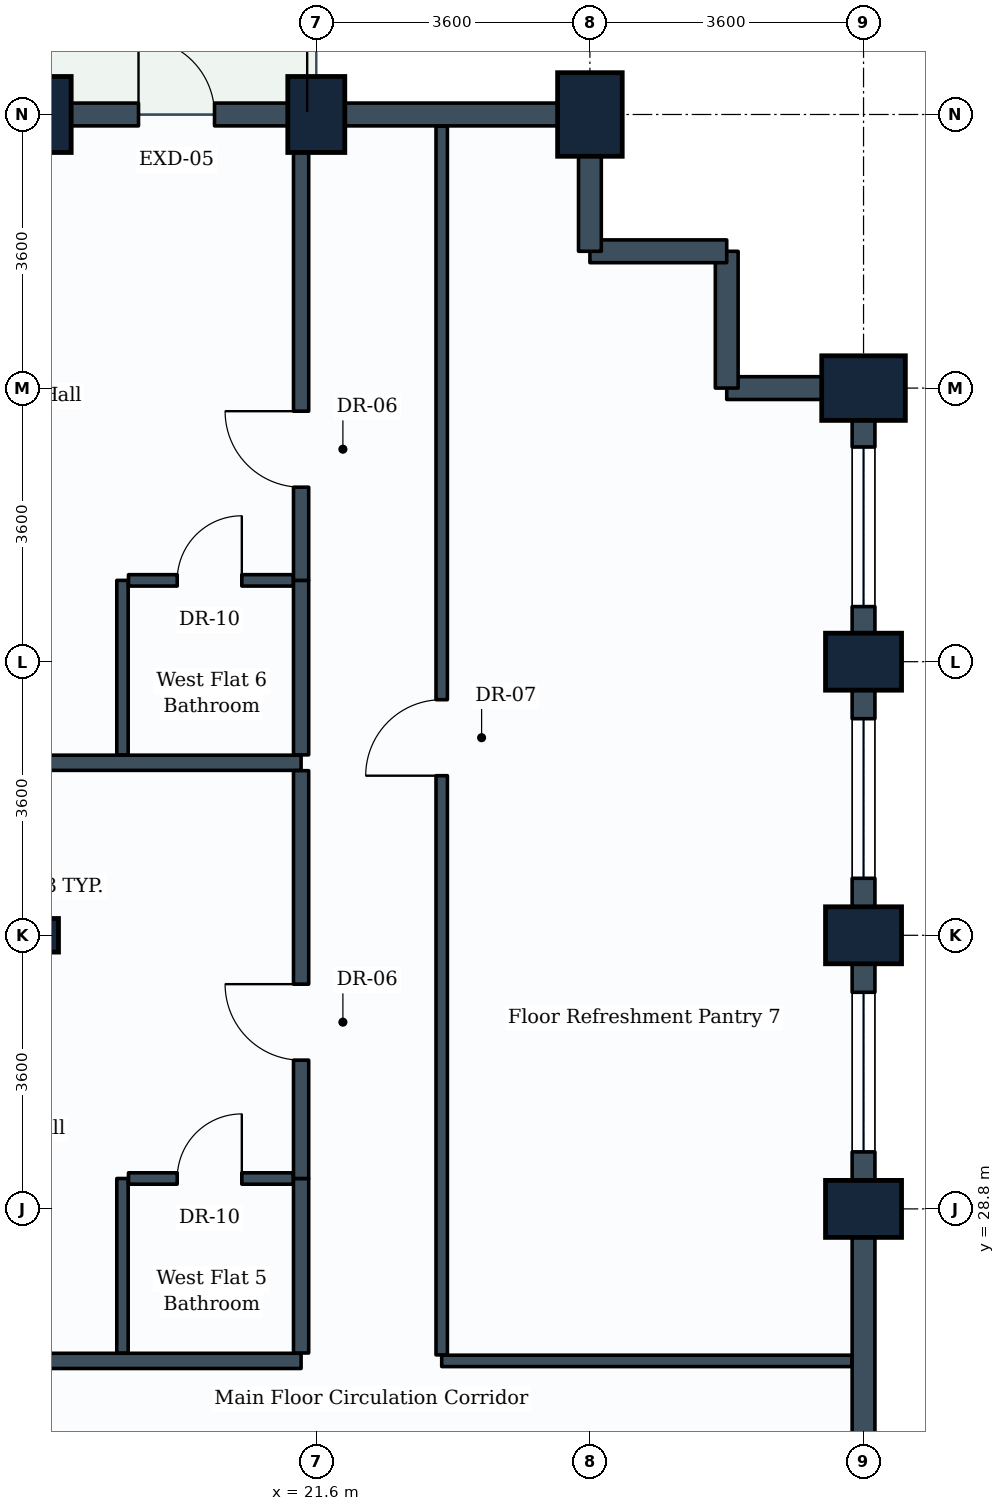
"""IFC4 building model, lengths in metres.
Left out: names, types, materials, properties, quantities, classifications, styles, units other than length and angle.
Written with IfcOpenShell. Run it as: python <this file> out.ifc"""

import sys

from ifc_helpers import new_model, si_unit, direction, frame, frame_2d, origin, origin_2d, place, context, subcontext, project, spatial, rectangle, i_section, extrude, element, fill, save


model = new_model("IFC4")
c1 = context("Model", 3, precision=1e-05, world=origin(), true_north=direction((0.0, 1.0)))
c2 = subcontext(c1, "Body", "Model", "MODEL_VIEW")
j1 = project(units=[si_unit("LENGTHUNIT", "METRE"), si_unit("PLANEANGLEUNIT", "RADIAN")], contexts=[c1])
p1 = place(None, origin())
s1 = spatial("IfcSite", under=j1, at=p1, CompositionType="ELEMENT")
p2 = place(p1, origin())
s2 = spatial("IfcBuilding", under=s1, at=p2, CompositionType="ELEMENT")
p3 = place(p2, frame((0.0, 0.0, 131.4)))
s3 = spatial("IfcBuildingStorey", under=s2, at=p3, CompositionType="ELEMENT", Elevation=131.4)
p4 = place(p3, frame((18.0, 32.4, 0.0), z_axis=(0.0, 0.0, 1.0), x_axis=(1.0, 0.0, 0.0)))
e1 = element("IfcColumn", 1, at=p4, inside=s3, PredefinedType="COLUMN", context=c2, shape_type="SweptSolid", body=[
    extrude(i_section(OverallWidth=0.416, OverallDepth=0.442, WebThickness=0.025, FlangeThickness=0.041, FilletRadius=0.015, at=origin_2d()), origin(), (0.0, 0.0, 1.0), 3.8),
])
for number, where, z_axis, x_axis in (
    (2, (18.0, 43.2, 0.0), (0.0, 0.0, 1.0), (1.0, 0.0, 0.0)),
    (3, (21.6, 43.2, 0.0), (0.0, 0.0, 1.0), (1.0, 0.0, 0.0)),
):
    element("IfcColumn", number, at=place(p3, frame(where, z_axis=z_axis, x_axis=x_axis)), inside=s3, PredefinedType="COLUMN", context=c2, shape_type="SweptSolid", body=[
        extrude(rectangle(XDim=0.75, YDim=1.0, at=origin_2d()), origin(), (0.0, 0.0, 1.0), 3.8),
    ])
p5 = place(p3, frame((25.2, 43.2, 0.0), z_axis=(0.0, 0.0, 1.0), x_axis=(1.0, 0.0, 0.0)))
e4 = element("IfcColumn", 4, at=p5, inside=s3, PredefinedType="COLUMN", context=c2, shape_type="SweptSolid", body=[
    extrude(rectangle(XDim=0.85, YDim=1.1, at=origin_2d()), origin(), (0.0, 0.0, 1.0), 3.8),
])
for number, where, z_axis, x_axis in (
    (5, (28.8, 28.8, 0.0), (0.0, 0.0, 1.0), (0.0, 1.0, 0.0)),
    (6, (28.8, 32.4, 0.0), (0.0, 0.0, 1.0), (0.0, 1.0, 0.0)),
    (7, (28.8, 36.0, 0.0), (0.0, 0.0, 1.0), (0.0, 1.0, 0.0)),
):
    element("IfcColumn", number, at=place(p3, frame(where, z_axis=z_axis, x_axis=x_axis)), inside=s3, PredefinedType="COLUMN", context=c2, shape_type="SweptSolid", body=[
        extrude(rectangle(XDim=0.75, YDim=1.0, at=origin_2d()), origin(), (0.0, 0.0, 1.0), 3.8),
    ])
p6 = place(p3, frame((28.8, 39.6, 0.0), z_axis=(0.0, 0.0, 1.0), x_axis=(0.0, 1.0, 0.0)))
e8 = element("IfcColumn", 8, at=p6, inside=s3, PredefinedType="COLUMN", context=c2, shape_type="SweptSolid", body=[
    extrude(rectangle(XDim=0.85, YDim=1.1, at=origin_2d()), origin(), (0.0, 0.0, 1.0), 3.8),
])
p7 = place(p3, frame((28.8, 28.8, 0.0), z_axis=(0.0, 0.0, 1.0), x_axis=(0.0, -1.0, 0.0)))
e9 = element("IfcWall", 9, at=p7, inside=s3, PredefinedType="STANDARD", context=c2, shape_type="SweptSolid", body=[
    extrude(rectangle(XDim=3.6, YDim=0.3, at=frame_2d((1.8, 0.0))), origin(), (0.0, 0.0, 1.0), 3.17),
])
p8 = place(p3, frame((28.8, 32.4, 0.0), z_axis=(0.0, 0.0, 1.0), x_axis=(0.0, -1.0, 0.0)))
e10 = element("IfcWall", 10, at=p8, inside=s3, PredefinedType="STANDARD", context=c2, shape_type="SweptSolid", body=[
    extrude(rectangle(XDim=3.6, YDim=0.3, at=frame_2d((1.8, 0.0))), origin(), (0.0, 0.0, 1.0), 2.93),
])
p9 = place(p8, frame((0.75, 0.0, 0.85)))
e11 = element("IfcOpeningElement", 11, at=p9, cuts=e10, PredefinedType="OPENING", context=c2, shape_type="SweptSolid", body=[
    extrude(rectangle(XDim=2.1, YDim=1.35, at=frame_2d((1.05, 0.675))), frame((0.0, 0.16, 0.0), z_axis=(0.0, -1.0, 0.0), x_axis=(1.0, 0.0, 0.0)), (0.0, 0.0, 1.0), 0.32),
])
p10 = place(p3, frame((28.8, 36.0, 0.0), z_axis=(0.0, 0.0, 1.0), x_axis=(0.0, -1.0, 0.0)))
e12 = element("IfcWall", 12, at=p10, inside=s3, PredefinedType="STANDARD", context=c2, shape_type="SweptSolid", body=[
    extrude(rectangle(XDim=3.6, YDim=0.3, at=frame_2d((1.8, 0.0))), origin(), (0.0, 0.0, 1.0), 2.93),
])
p11 = place(p10, frame((0.75, 0.0, 0.85)))
e13 = element("IfcOpeningElement", 13, at=p11, cuts=e12, PredefinedType="OPENING", context=c2, shape_type="SweptSolid", body=[
    extrude(rectangle(XDim=2.1, YDim=1.35, at=frame_2d((1.05, 0.675))), frame((0.0, 0.16, 0.0), z_axis=(0.0, -1.0, 0.0), x_axis=(1.0, 0.0, 0.0)), (0.0, 0.0, 1.0), 0.32),
])
p12 = place(p3, frame((28.8, 39.6, 0.0), z_axis=(0.0, 0.0, 1.0), x_axis=(0.0, -1.0, 0.0)))
e14 = element("IfcWall", 14, at=p12, inside=s3, PredefinedType="STANDARD", context=c2, shape_type="SweptSolid", body=[
    extrude(rectangle(XDim=3.6, YDim=0.3, at=frame_2d((1.8, 0.0))), origin(), (0.0, 0.0, 1.0), 2.93),
])
p13 = place(p12, frame((0.775, 0.0, 0.85)))
e15 = element("IfcOpeningElement", 15, at=p13, cuts=e14, PredefinedType="OPENING", context=c2, shape_type="SweptSolid", body=[
    extrude(rectangle(XDim=2.1, YDim=1.35, at=frame_2d((1.05, 0.675))), frame((0.0, 0.16, 0.0), z_axis=(0.0, -1.0, 0.0), x_axis=(1.0, 0.0, 0.0)), (0.0, 0.0, 1.0), 0.32),
])
p14 = place(p3, frame((27.0, 39.6, 0.0), z_axis=(0.0, 0.0, 1.0), x_axis=(1.0, 0.0, 0.0)))
e16 = element("IfcWall", 16, at=p14, inside=s3, PredefinedType="STANDARD", context=c2, shape_type="SweptSolid", body=[
    extrude(rectangle(XDim=1.8, YDim=0.3, at=frame_2d((0.9, 0.0))), origin(), (0.0, 0.0, 1.0), 2.93),
])
p15 = place(p3, frame((27.0, 39.6, 0.0), z_axis=(0.0, 0.0, 1.0), x_axis=(0.0, 1.0, 0.0)))
e17 = element("IfcWall", 17, at=p15, inside=s3, PredefinedType="STANDARD", context=c2, shape_type="SweptSolid", body=[
    extrude(rectangle(XDim=1.8, YDim=0.3, at=frame_2d((0.9, 0.0))), origin(), (0.0, 0.0, 1.0), 3.535),
])
p16 = place(p3, frame((25.2, 41.4, 0.0), z_axis=(0.0, 0.0, 1.0), x_axis=(1.0, 0.0, 0.0)))
e18 = element("IfcWall", 18, at=p16, inside=s3, PredefinedType="STANDARD", context=c2, shape_type="SweptSolid", body=[
    extrude(rectangle(XDim=1.8, YDim=0.3, at=frame_2d((0.9, 0.0))), origin(), (0.0, 0.0, 1.0), 3.535),
])
p17 = place(p3, frame((25.2, 41.4, 0.0), z_axis=(0.0, 0.0, 1.0), x_axis=(0.0, 1.0, 0.0)))
e19 = element("IfcWall", 19, at=p17, inside=s3, PredefinedType="STANDARD", context=c2, shape_type="SweptSolid", body=[
    extrude(rectangle(XDim=1.8, YDim=0.3, at=frame_2d((0.9, 0.0))), origin(), (0.0, 0.0, 1.0), 2.93),
])
p18 = place(p3, frame((21.6, 43.2, 0.0), z_axis=(0.0, 0.0, 1.0), x_axis=(1.0, 0.0, 0.0)))
e20 = element("IfcWall", 20, at=p18, inside=s3, PredefinedType="STANDARD", context=c2, shape_type="SweptSolid", body=[
    extrude(rectangle(XDim=3.6, YDim=0.3, at=frame_2d((1.8, 0.0))), origin(), (0.0, 0.0, 1.0), 2.93),
])
p19 = place(p3, frame((18.0, 43.2, 0.0), z_axis=(0.0, 0.0, 1.0), x_axis=(1.0, 0.0, 0.0)))
e21 = element("IfcWall", 21, at=p19, inside=s3, PredefinedType="STANDARD", context=c2, shape_type="SweptSolid", body=[
    extrude(rectangle(XDim=3.6, YDim=0.3, at=frame_2d((1.8, 0.0))), origin(), (0.0, 0.0, 1.0), 2.93),
])
p20 = place(p19, frame((1.261, 0.0, 0.0)))
e22 = element("IfcOpeningElement", 22, at=p20, cuts=e21, PredefinedType="OPENING", context=c2, shape_type="SweptSolid", body=[
    extrude(rectangle(XDim=1.0, YDim=2.1, at=frame_2d((0.5, 1.05))), frame((0.0, 0.16, 0.0), z_axis=(0.0, -1.0, 0.0), x_axis=(1.0, 0.0, 0.0)), (0.0, 0.0, 1.0), 0.32),
])
for number, where, z_axis, x_axis in (
    (23, (7.354, 26.8, 0.0), (0.0, 0.0, 1.0), (1.0, 0.0, 0.0)),
    (24, (7.354, 34.67, 0.0), (0.0, 0.0, 1.0), (1.0, 0.0, 0.0)),
):
    element("IfcWall", number, at=place(p3, frame(where, z_axis=z_axis, x_axis=x_axis)), inside=s3, PredefinedType="PARTITIONING", context=c2, shape_type="SweptSolid", body=[
        extrude(rectangle(XDim=14.046, YDim=0.2, at=frame_2d((7.023, 0.0))), origin(), (0.0, 0.0, 1.0), 2.93),
    ])
p21 = place(p3, frame((21.4, 26.904, 0.0), z_axis=(0.0, 0.0, 1.0), x_axis=(0.0, 1.0, 0.0)))
e25 = element("IfcWall", 25, at=p21, inside=s3, PredefinedType="PARTITIONING", context=c2, shape_type="SweptSolid", body=[
    extrude(rectangle(XDim=2.296, YDim=0.2, at=frame_2d((1.148, 0.0))), origin(), (0.0, 0.0, 1.0), 3.13),
])
p22 = place(p3, frame((19.05, 26.904, 0.0), z_axis=(0.0, 0.0, 1.0), x_axis=(0.0, 1.0, 0.0)))
e26 = element("IfcWall", 26, at=p22, inside=s3, PredefinedType="PARTITIONING", context=c2, shape_type="SweptSolid", body=[
    extrude(rectangle(XDim=2.296, YDim=0.15, at=frame_2d((1.148, 0.0))), origin(), (0.0, 0.0, 1.0), 3.17),
])
p23 = place(p3, frame((19.129, 29.2, 0.0), z_axis=(0.0, 0.0, 1.0), x_axis=(1.0, 0.0, 0.0)))
e27 = element("IfcWall", 27, at=p23, inside=s3, PredefinedType="PARTITIONING", context=c2, shape_type="SweptSolid", body=[
    extrude(rectangle(XDim=2.167, YDim=0.15, at=frame_2d((1.083, 0.0))), origin(), (0.0, 0.0, 1.0), 3.535),
])
p24 = place(p23, frame((0.641, 0.0, 0.0)))
e28 = element("IfcOpeningElement", 28, at=p24, cuts=e27, PredefinedType="OPENING", context=c2, shape_type="SweptSolid", body=[
    extrude(rectangle(XDim=0.85, YDim=2.1, at=frame_2d((0.425, 1.05))), frame((0.0, 0.085, 0.0), z_axis=(0.0, -1.0, 0.0), x_axis=(1.0, 0.0, 0.0)), (0.0, 0.0, 1.0), 0.17),
])
p25 = place(p3, frame((21.4, 29.2, 0.0), z_axis=(0.0, 0.0, 1.0), x_axis=(0.0, 1.0, 0.0)))
e29 = element("IfcWall", 29, at=p25, inside=s3, PredefinedType="PARTITIONING", context=c2, shape_type="SweptSolid", body=[
    extrude(rectangle(XDim=5.366, YDim=0.2, at=frame_2d((2.683, 0.0))), origin(), (0.0, 0.0, 1.0), 3.13),
])
p26 = place(p25, frame((1.557, 0.0, 0.0)))
e30 = element("IfcOpeningElement", 30, at=p26, cuts=e29, PredefinedType="OPENING", context=c2, shape_type="SweptSolid", body=[
    extrude(rectangle(XDim=1.0, YDim=2.1, at=frame_2d((0.5, 1.05))), frame((0.0, 0.11, 0.0), z_axis=(0.0, -1.0, 0.0), x_axis=(1.0, 0.0, 0.0)), (0.0, 0.0, 1.0), 0.22),
])
p27 = place(p3, frame((21.4, 34.774, 0.0), z_axis=(0.0, 0.0, 1.0), x_axis=(0.0, 1.0, 0.0)))
e31 = element("IfcWall", 31, at=p27, inside=s3, PredefinedType="PARTITIONING", context=c2, shape_type="SweptSolid", body=[
    extrude(rectangle(XDim=2.296, YDim=0.2, at=frame_2d((1.148, 0.0))), origin(), (0.0, 0.0, 1.0), 3.17),
])
p28 = place(p3, frame((19.05, 34.774, 0.0), z_axis=(0.0, 0.0, 1.0), x_axis=(0.0, 1.0, 0.0)))
e32 = element("IfcWall", 32, at=p28, inside=s3, PredefinedType="PARTITIONING", context=c2, shape_type="SweptSolid", body=[
    extrude(rectangle(XDim=2.296, YDim=0.15, at=frame_2d((1.148, 0.0))), origin(), (0.0, 0.0, 1.0), 3.17),
])
p29 = place(p3, frame((19.129, 37.07, 0.0), z_axis=(0.0, 0.0, 1.0), x_axis=(1.0, 0.0, 0.0)))
e33 = element("IfcWall", 33, at=p29, inside=s3, PredefinedType="PARTITIONING", context=c2, shape_type="SweptSolid", body=[
    extrude(rectangle(XDim=2.167, YDim=0.15, at=frame_2d((1.083, 0.0))), origin(), (0.0, 0.0, 1.0), 3.535),
])
p30 = place(p29, frame((0.641, 0.0, 0.0)))
e34 = element("IfcOpeningElement", 34, at=p30, cuts=e33, PredefinedType="OPENING", context=c2, shape_type="SweptSolid", body=[
    extrude(rectangle(XDim=0.85, YDim=2.1, at=frame_2d((0.425, 1.05))), frame((0.0, 0.085, 0.0), z_axis=(0.0, -1.0, 0.0), x_axis=(1.0, 0.0, 0.0)), (0.0, 0.0, 1.0), 0.17),
])
p31 = place(p3, frame((21.4, 37.07, 0.0), z_axis=(0.0, 0.0, 1.0), x_axis=(0.0, 1.0, 0.0)))
e35 = element("IfcWall", 35, at=p31, inside=s3, PredefinedType="PARTITIONING", context=c2, shape_type="SweptSolid", body=[
    extrude(rectangle(XDim=5.976, YDim=0.2, at=frame_2d((2.988, 0.0))), origin(), (0.0, 0.0, 1.0), 2.93),
])
p32 = place(p31, frame((1.226, 0.0, 0.0)))
e36 = element("IfcOpeningElement", 36, at=p32, cuts=e35, PredefinedType="OPENING", context=c2, shape_type="SweptSolid", body=[
    extrude(rectangle(XDim=1.0, YDim=2.1, at=frame_2d((0.5, 1.05))), frame((0.0, 0.11, 0.0), z_axis=(0.0, -1.0, 0.0), x_axis=(1.0, 0.0, 0.0)), (0.0, 0.0, 1.0), 0.22),
])
p33 = place(p3, frame((23.25, 26.8, 0.0), z_axis=(0.0, 0.0, 1.0), x_axis=(1.0, 0.0, 0.0)))
e37 = element("IfcWall", 37, at=p33, inside=s3, PredefinedType="PARTITIONING", context=c2, shape_type="SweptSolid", body=[
    extrude(rectangle(XDim=5.396, YDim=0.15, at=frame_2d((2.698, 0.0))), origin(), (0.0, 0.0, 1.0), 3.535),
])
p34 = place(p3, frame((23.25, 26.879, 0.0), z_axis=(0.0, 0.0, 1.0), x_axis=(0.0, 1.0, 0.0)))
e38 = element("IfcWall", 38, at=p34, inside=s3, PredefinedType="PARTITIONING", context=c2, shape_type="SweptSolid", body=[
    extrude(rectangle(XDim=16.167, YDim=0.15, at=frame_2d((8.083, 0.0))), origin(), (0.0, 0.0, 1.0), 2.93),
])
p35 = place(p34, frame((7.621, 0.0, 0.0)))
e39 = element("IfcOpeningElement", 39, at=p35, cuts=e38, PredefinedType="OPENING", context=c2, shape_type="SweptSolid", body=[
    extrude(rectangle(XDim=1.0, YDim=2.1, at=frame_2d((0.5, 1.05))), frame((0.0, 0.085, 0.0), z_axis=(0.0, -1.0, 0.0), x_axis=(1.0, 0.0, 0.0)), (0.0, 0.0, 1.0), 0.17),
])
p36 = place(p9, origin())
e40 = element("IfcWindow", 40, at=p36, inside=s3, PartitioningType="SINGLE_PANEL", PredefinedType="WINDOW", context=c2, shape_type="SweptSolid", body=[
    extrude(rectangle(XDim=2.1, YDim=1.35, at=frame_2d((1.05, 0.675))), frame((0.0, 0.03, 0.0), z_axis=(0.0, -1.0, 0.0), x_axis=(1.0, 0.0, 0.0)), (0.0, 0.0, 1.0), 0.06),
])
fill(e11, e40)
p37 = place(p11, origin())
e41 = element("IfcWindow", 41, at=p37, inside=s3, PartitioningType="SINGLE_PANEL", PredefinedType="WINDOW", context=c2, shape_type="SweptSolid", body=[
    extrude(rectangle(XDim=2.1, YDim=1.35, at=frame_2d((1.05, 0.675))), frame((0.0, 0.03, 0.0), z_axis=(0.0, -1.0, 0.0), x_axis=(1.0, 0.0, 0.0)), (0.0, 0.0, 1.0), 0.06),
])
fill(e13, e41)
p38 = place(p13, origin())
e42 = element("IfcWindow", 42, at=p38, inside=s3, PartitioningType="SINGLE_PANEL", PredefinedType="WINDOW", context=c2, shape_type="SweptSolid", body=[
    extrude(rectangle(XDim=2.1, YDim=1.35, at=frame_2d((1.05, 0.675))), frame((0.0, 0.03, 0.0), z_axis=(0.0, -1.0, 0.0), x_axis=(1.0, 0.0, 0.0)), (0.0, 0.0, 1.0), 0.06),
])
fill(e15, e42)
p39 = place(p20, origin())
e43 = element("IfcDoor", 43, at=p39, inside=s3, OperationType="SINGLE_SWING_LEFT", PredefinedType="DOOR", context=c2, shape_type="SweptSolid", body=[
    extrude(rectangle(XDim=1.0, YDim=2.1, at=frame_2d((0.5, 1.05))), frame((0.0, 0.025, 0.0), z_axis=(0.0, -1.0, 0.0), x_axis=(1.0, 0.0, 0.0)), (0.0, 0.0, 1.0), 0.05),
])
fill(e22, e43)
p40 = place(p24, origin())
e44 = element("IfcDoor", 44, at=p40, inside=s3, OperationType="SINGLE_SWING_RIGHT", PredefinedType="DOOR", context=c2, shape_type="SweptSolid", body=[
    extrude(rectangle(XDim=0.85, YDim=2.1, at=frame_2d((0.425, 1.05))), frame((0.0, 0.025, 0.0), z_axis=(0.0, -1.0, 0.0), x_axis=(1.0, 0.0, 0.0)), (0.0, 0.0, 1.0), 0.05),
])
fill(e28, e44)
p41 = place(p26, origin())
e45 = element("IfcDoor", 45, at=p41, inside=s3, OperationType="SINGLE_SWING_RIGHT", PredefinedType="DOOR", context=c2, shape_type="SweptSolid", body=[
    extrude(rectangle(XDim=1.0, YDim=2.1, at=frame_2d((0.5, 1.05))), frame((0.0, 0.025, 0.0), z_axis=(0.0, -1.0, 0.0), x_axis=(1.0, 0.0, 0.0)), (0.0, 0.0, 1.0), 0.05),
])
fill(e30, e45)
p42 = place(p30, origin())
e46 = element("IfcDoor", 46, at=p42, inside=s3, OperationType="SINGLE_SWING_RIGHT", PredefinedType="DOOR", context=c2, shape_type="SweptSolid", body=[
    extrude(rectangle(XDim=0.85, YDim=2.1, at=frame_2d((0.425, 1.05))), frame((0.0, 0.025, 0.0), z_axis=(0.0, -1.0, 0.0), x_axis=(1.0, 0.0, 0.0)), (0.0, 0.0, 1.0), 0.05),
])
fill(e34, e46)
p43 = place(p32, origin())
e47 = element("IfcDoor", 47, at=p43, inside=s3, OperationType="SINGLE_SWING_RIGHT", PredefinedType="DOOR", context=c2, shape_type="SweptSolid", body=[
    extrude(rectangle(XDim=1.0, YDim=2.1, at=frame_2d((0.5, 1.05))), frame((0.0, 0.025, 0.0), z_axis=(0.0, -1.0, 0.0), x_axis=(1.0, 0.0, 0.0)), (0.0, 0.0, 1.0), 0.05),
])
fill(e36, e47)
p44 = place(p35, origin())
e48 = element("IfcDoor", 48, at=p44, inside=s3, OperationType="SINGLE_SWING_LEFT", PredefinedType="DOOR", context=c2, shape_type="SweptSolid", body=[
    extrude(rectangle(XDim=1.0, YDim=2.1, at=frame_2d((0.5, 1.05))), frame((0.0, 0.025, 0.0), z_axis=(0.0, -1.0, 0.0), x_axis=(1.0, 0.0, 0.0)), (0.0, 0.0, 1.0), 0.05),
])
fill(e39, e48)
save(model, sys.argv[1])
